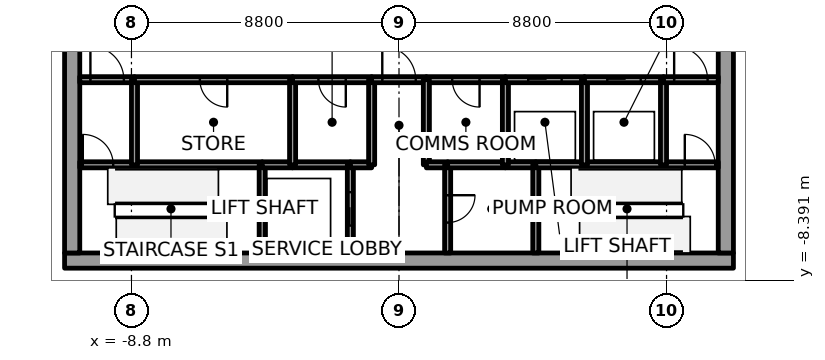
"""IFC4 building model, lengths in metres.
Left out: names, types, materials, properties, quantities, classifications, styles, units other than length and angle.
Written with IfcOpenShell. Run it as: python <this file> out.ifc"""

import sys

from ifc_helpers import new_model, si_unit, direction, frame, frame_2d, origin, place, context, subcontext, project, spatial, rectangle, extrude, element, fill, save


model = new_model("IFC4")
c1 = context("Model", 3, precision=1e-05, world=origin(), true_north=direction((0.0, 1.0)))
c2 = subcontext(c1, "Body", "Model", "MODEL_VIEW")
j1 = project(units=[si_unit("LENGTHUNIT", "METRE"), si_unit("PLANEANGLEUNIT", "RADIAN")], contexts=[c1])
p1 = place(None, origin())
s1 = spatial("IfcSite", under=j1, at=p1, CompositionType="ELEMENT")
p2 = place(p1, origin())
s2 = spatial("IfcBuilding", under=s1, at=p2, CompositionType="ELEMENT")
p3 = place(p2, frame((0.0, 0.0, -9.0)))
s3 = spatial("IfcBuildingStorey", under=s2, at=p3, CompositionType="ELEMENT", Elevation=-9.0)
p4 = place(p3, frame((-11.0, -7.75, 0.0), z_axis=(0.0, 0.0, 1.0), x_axis=(1.0, 0.0, 0.0)))
e1 = element("IfcWall", 1, at=p4, inside=s3, PredefinedType="SHEAR", context=c2, shape_type="SweptSolid", body=[
    extrude(rectangle(XDim=22.0, YDim=0.5, at=frame_2d((11.0, 0.0))), origin(), (0.0, 0.0, 1.0), 4.5),
])
for number, where, z_axis, x_axis in (
    (2, (-10.75, -7.5, 0.0), (0.0, 0.0, 1.0), (0.0, 1.0, 0.0)),
    (3, (10.75, -7.5, 0.0), (0.0, 0.0, 1.0), (0.0, 1.0, 0.0)),
):
    element("IfcWall", number, at=place(p3, frame(where, z_axis=z_axis, x_axis=x_axis)), inside=s3, PredefinedType="SHEAR", context=c2, shape_type="SweptSolid", body=[
        extrude(rectangle(XDim=15.0, YDim=0.5, at=frame_2d((7.5, 0.0))), origin(), (0.0, 0.0, 1.0), 4.5),
    ])
p5 = place(p3, frame((-10.5, -4.6, 0.0), z_axis=(0.0, 0.0, 1.0), x_axis=(1.0, 0.0, 0.0)))
e4 = element("IfcWall", 4, at=p5, inside=s3, PredefinedType="SOLIDWALL", context=c2, shape_type="SweptSolid", body=[
    extrude(rectangle(XDim=1.8, YDim=0.2, at=frame_2d((0.9, 0.0))), origin(), (0.0, 0.0, 1.0), 4.35),
])
p6 = place(p5, frame((0.1, 0.0, 0.0)))
e5 = element("IfcOpeningElement", 5, at=p6, cuts=e4, PredefinedType="OPENING", context=c2, shape_type="SweptSolid", body=[
    extrude(rectangle(XDim=1.0, YDim=2.1, at=frame_2d((0.5, 1.05))), frame((0.0, 0.1, 0.0), z_axis=(0.0, -1.0, 0.0), x_axis=(1.0, 0.0, 0.0)), (0.0, 0.0, 1.0), 0.2),
])
p7 = place(p3, frame((-10.5, -1.8, 0.0), z_axis=(0.0, 0.0, 1.0), x_axis=(1.0, 0.0, 0.0)))
e6 = element("IfcWall", 6, at=p7, inside=s3, PredefinedType="SOLIDWALL", context=c2, shape_type="SweptSolid", body=[
    extrude(rectangle(XDim=1.8, YDim=0.2, at=frame_2d((0.9, 0.0))), origin(), (0.0, 0.0, 1.0), 4.35),
])
p8 = place(p7, frame((0.35, 0.0, 0.0)))
e7 = element("IfcOpeningElement", 7, at=p8, cuts=e6, PredefinedType="OPENING", context=c2, shape_type="SweptSolid", body=[
    extrude(rectangle(XDim=1.1, YDim=2.4, at=frame_2d((0.55, 1.2))), frame((0.0, 0.1, 0.0), z_axis=(0.0, -1.0, 0.0), x_axis=(1.0, 0.0, 0.0)), (0.0, 0.0, 1.0), 0.2),
])
p9 = place(p3, frame((-8.7, -4.6, 0.0), z_axis=(0.0, 0.0, 1.0), x_axis=(1.0, 0.0, 0.0)))
e8 = element("IfcWall", 8, at=p9, inside=s3, PredefinedType="SOLIDWALL", context=c2, shape_type="SweptSolid", body=[
    extrude(rectangle(XDim=4.2, YDim=0.2, at=frame_2d((2.1, 0.0))), origin(), (0.0, 0.0, 1.0), 4.35),
])
p10 = place(p3, frame((-8.7, -1.8, 0.0), z_axis=(0.0, 0.0, 1.0), x_axis=(0.0, -1.0, 0.0)))
e9 = element("IfcWall", 9, at=p10, inside=s3, PredefinedType="SOLIDWALL", context=c2, shape_type="SweptSolid", body=[
    extrude(rectangle(XDim=2.8, YDim=0.2, at=frame_2d((1.4, 0.0))), origin(), (0.0, 0.0, 1.0), 4.35),
])
p11 = place(p3, frame((-3.5, -1.8, 0.0), z_axis=(0.0, 0.0, 1.0), x_axis=(-1.0, 0.0, 0.0)))
e10 = element("IfcWall", 10, at=p11, inside=s3, PredefinedType="SOLIDWALL", context=c2, shape_type="SweptSolid", body=[
    extrude(rectangle(XDim=5.2, YDim=0.2, at=frame_2d((2.6, 0.0))), origin(), (0.0, 0.0, 1.0), 4.35),
])
p12 = place(p11, frame((2.15, 0.0, 0.0)))
e11 = element("IfcOpeningElement", 11, at=p12, cuts=e10, PredefinedType="OPENING", context=c2, shape_type="SweptSolid", body=[
    extrude(rectangle(XDim=0.9, YDim=2.4, at=frame_2d((0.45, 1.2))), frame((0.0, 0.1, 0.0), z_axis=(0.0, -1.0, 0.0), x_axis=(1.0, 0.0, 0.0)), (0.0, 0.0, 1.0), 0.2),
])
p13 = place(p3, frame((-4.5, -4.6, 0.0), z_axis=(0.0, 0.0, 1.0), x_axis=(0.0, -1.0, 0.0)))
e12 = element("IfcWall", 12, at=p13, inside=s3, PredefinedType="SOLIDWALL", context=c2, shape_type="SweptSolid", body=[
    extrude(rectangle(XDim=2.9, YDim=0.2, at=frame_2d((1.45, 0.0))), origin(), (0.0, 0.0, 1.0), 4.35),
])
p14 = place(p3, frame((-4.5, -4.6, 0.0), z_axis=(0.0, 0.0, 1.0), x_axis=(1.0, 0.0, 0.0)))
e13 = element("IfcWall", 13, at=p14, inside=s3, PredefinedType="SOLIDWALL", context=c2, shape_type="SweptSolid", body=[
    extrude(rectangle(XDim=1.0, YDim=0.2, at=frame_2d((0.5, 0.0))), origin(), (0.0, 0.0, 1.0), 4.35),
])
p15 = place(p3, frame((-3.5, -4.6, 0.0), z_axis=(0.0, 0.0, 1.0), x_axis=(1.0, 0.0, 0.0)))
e14 = element("IfcWall", 14, at=p15, inside=s3, PredefinedType="SOLIDWALL", context=c2, shape_type="SweptSolid", body=[
    extrude(rectangle(XDim=1.9, YDim=0.2, at=frame_2d((0.95, 0.0))), origin(), (0.0, 0.0, 1.0), 4.35),
])
p16 = place(p3, frame((-3.5, -4.6, 0.0), z_axis=(0.0, 0.0, 1.0), x_axis=(0.0, 1.0, 0.0)))
e15 = element("IfcWall", 15, at=p16, inside=s3, PredefinedType="SOLIDWALL", context=c2, shape_type="SweptSolid", body=[
    extrude(rectangle(XDim=2.8, YDim=0.2, at=frame_2d((1.4, 0.0))), origin(), (0.0, 0.0, 1.0), 4.35),
])
p17 = place(p3, frame((-0.9, -1.8, 0.0), z_axis=(0.0, 0.0, 1.0), x_axis=(-1.0, 0.0, 0.0)))
e16 = element("IfcWall", 16, at=p17, inside=s3, PredefinedType="SOLIDWALL", context=c2, shape_type="SweptSolid", body=[
    extrude(rectangle(XDim=2.6, YDim=0.2, at=frame_2d((1.3, 0.0))), origin(), (0.0, 0.0, 1.0), 4.35),
])
p18 = place(p17, frame((0.85, 0.0, 0.0)))
e17 = element("IfcOpeningElement", 17, at=p18, cuts=e16, PredefinedType="OPENING", context=c2, shape_type="SweptSolid", body=[
    extrude(rectangle(XDim=0.9, YDim=2.4, at=frame_2d((0.45, 1.2))), frame((0.0, 0.1, 0.0), z_axis=(0.0, -1.0, 0.0), x_axis=(1.0, 0.0, 0.0)), (0.0, 0.0, 1.0), 0.2),
])
p19 = place(p3, frame((-1.6, -7.5, 0.0), z_axis=(0.0, 0.0, 1.0), x_axis=(0.0, 1.0, 0.0)))
e18 = element("IfcWall", 18, at=p19, inside=s3, PredefinedType="SOLIDWALL", context=c2, shape_type="SweptSolid", body=[
    extrude(rectangle(XDim=2.9, YDim=0.2, at=frame_2d((1.45, 0.0))), origin(), (0.0, 0.0, 1.0), 4.35),
])
p20 = place(p19, frame((0.9, 0.0, 0.0)))
e19 = element("IfcOpeningElement", 19, at=p20, cuts=e18, PredefinedType="OPENING", context=c2, shape_type="SweptSolid", body=[
    extrude(rectangle(XDim=1.1, YDim=2.1, at=frame_2d((0.55, 1.05))), frame((0.0, 0.1, 0.0), z_axis=(0.0, -1.0, 0.0), x_axis=(1.0, 0.0, 0.0)), (0.0, 0.0, 1.0), 0.2),
])
p21 = place(p3, frame((-1.6, -4.6, 0.0), z_axis=(0.0, 0.0, 1.0), x_axis=(1.0, 0.0, 0.0)))
e20 = element("IfcWall", 20, at=p21, inside=s3, PredefinedType="SOLIDWALL", context=c2, shape_type="SweptSolid", body=[
    extrude(rectangle(XDim=0.7, YDim=0.2, at=frame_2d((0.35, 0.0))), origin(), (0.0, 0.0, 1.0), 4.35),
])
p22 = place(p3, frame((-0.9, -4.6, 0.0), z_axis=(0.0, 0.0, 1.0), x_axis=(0.0, 1.0, 0.0)))
e21 = element("IfcWall", 21, at=p22, inside=s3, PredefinedType="SOLIDWALL", context=c2, shape_type="SweptSolid", body=[
    extrude(rectangle(XDim=2.8, YDim=0.2, at=frame_2d((1.4, 0.0))), origin(), (0.0, 0.0, 1.0), 4.35),
])
p23 = place(p3, frame((-0.9, -1.8, 0.0), z_axis=(0.0, 0.0, 1.0), x_axis=(1.0, 0.0, 0.0)))
e22 = element("IfcWall", 22, at=p23, inside=s3, PredefinedType="SOLIDWALL", context=c2, shape_type="SweptSolid", body=[
    extrude(rectangle(XDim=1.8, YDim=0.2, at=frame_2d((0.9, 0.0))), origin(), (0.0, 0.0, 1.0), 4.35),
])
p24 = place(p23, frame((0.35, 0.0, 0.0)))
e23 = element("IfcOpeningElement", 23, at=p24, cuts=e22, PredefinedType="OPENING", context=c2, shape_type="SweptSolid", body=[
    extrude(rectangle(XDim=1.1, YDim=2.4, at=frame_2d((0.55, 1.2))), frame((0.0, 0.1, 0.0), z_axis=(0.0, -1.0, 0.0), x_axis=(1.0, 0.0, 0.0)), (0.0, 0.0, 1.0), 0.2),
])
p25 = place(p3, frame((3.5, -1.8, 0.0), z_axis=(0.0, 0.0, 1.0), x_axis=(-1.0, 0.0, 0.0)))
e24 = element("IfcWall", 24, at=p25, inside=s3, PredefinedType="SOLIDWALL", context=c2, shape_type="SweptSolid", body=[
    extrude(rectangle(XDim=2.6, YDim=0.2, at=frame_2d((1.3, 0.0))), origin(), (0.0, 0.0, 1.0), 4.35),
])
p26 = place(p25, frame((0.85, 0.0, 0.0)))
e25 = element("IfcOpeningElement", 25, at=p26, cuts=e24, PredefinedType="OPENING", context=c2, shape_type="SweptSolid", body=[
    extrude(rectangle(XDim=0.9, YDim=2.4, at=frame_2d((0.45, 1.2))), frame((0.0, 0.1, 0.0), z_axis=(0.0, -1.0, 0.0), x_axis=(1.0, 0.0, 0.0)), (0.0, 0.0, 1.0), 0.2),
])
p27 = place(p3, frame((0.9, -1.8, 0.0), z_axis=(0.0, 0.0, 1.0), x_axis=(0.0, -1.0, 0.0)))
e26 = element("IfcWall", 26, at=p27, inside=s3, PredefinedType="SOLIDWALL", context=c2, shape_type="SweptSolid", body=[
    extrude(rectangle(XDim=2.8, YDim=0.2, at=frame_2d((1.4, 0.0))), origin(), (0.0, 0.0, 1.0), 4.35),
])
p28 = place(p3, frame((0.9, -4.6, 0.0), z_axis=(0.0, 0.0, 1.0), x_axis=(1.0, 0.0, 0.0)))
e27 = element("IfcWall", 27, at=p28, inside=s3, PredefinedType="SOLIDWALL", context=c2, shape_type="SweptSolid", body=[
    extrude(rectangle(XDim=0.7, YDim=0.2, at=frame_2d((0.35, 0.0))), origin(), (0.0, 0.0, 1.0), 4.35),
])
p29 = place(p3, frame((1.6, -4.6, 0.0), z_axis=(0.0, 0.0, 1.0), x_axis=(0.0, -1.0, 0.0)))
e28 = element("IfcWall", 28, at=p29, inside=s3, PredefinedType="SOLIDWALL", context=c2, shape_type="SweptSolid", body=[
    extrude(rectangle(XDim=2.9, YDim=0.2, at=frame_2d((1.45, 0.0))), origin(), (0.0, 0.0, 1.0), 4.35),
])
p30 = place(p29, frame((1.0, 0.0, 0.0)))
e29 = element("IfcOpeningElement", 29, at=p30, cuts=e28, PredefinedType="OPENING", context=c2, shape_type="SweptSolid", body=[
    extrude(rectangle(XDim=0.9, YDim=2.4, at=frame_2d((0.45, 1.2))), frame((0.0, 0.1, 0.0), z_axis=(0.0, -1.0, 0.0), x_axis=(1.0, 0.0, 0.0)), (0.0, 0.0, 1.0), 0.2),
])
p31 = place(p3, frame((1.6, -4.6, 0.0), z_axis=(0.0, 0.0, 1.0), x_axis=(1.0, 0.0, 0.0)))
e30 = element("IfcWall", 30, at=p31, inside=s3, PredefinedType="SOLIDWALL", context=c2, shape_type="SweptSolid", body=[
    extrude(rectangle(XDim=1.9, YDim=0.2, at=frame_2d((0.95, 0.0))), origin(), (0.0, 0.0, 1.0), 4.35),
])
p32 = place(p3, frame((4.5, -4.6, 0.0), z_axis=(0.0, 0.0, 1.0), x_axis=(-1.0, 0.0, 0.0)))
e31 = element("IfcWall", 31, at=p32, inside=s3, PredefinedType="SOLIDWALL", context=c2, shape_type="SweptSolid", body=[
    extrude(rectangle(XDim=1.0, YDim=0.2, at=frame_2d((0.5, 0.0))), origin(), (0.0, 0.0, 1.0), 4.35),
])
p33 = place(p3, frame((3.5, -4.6, 0.0), z_axis=(0.0, 0.0, 1.0), x_axis=(0.0, 1.0, 0.0)))
e32 = element("IfcWall", 32, at=p33, inside=s3, PredefinedType="SOLIDWALL", context=c2, shape_type="SweptSolid", body=[
    extrude(rectangle(XDim=2.8, YDim=0.2, at=frame_2d((1.4, 0.0))), origin(), (0.0, 0.0, 1.0), 4.35),
])
p34 = place(p3, frame((3.5, -1.8, 0.0), z_axis=(0.0, 0.0, 1.0), x_axis=(1.0, 0.0, 0.0)))
e33 = element("IfcWall", 33, at=p34, inside=s3, PredefinedType="SOLIDWALL", context=c2, shape_type="SweptSolid", body=[
    extrude(rectangle(XDim=2.6, YDim=0.2, at=frame_2d((1.3, 0.0))), origin(), (0.0, 0.0, 1.0), 4.35),
])
p35 = place(p34, frame((0.75, 0.0, 0.0)))
e34 = element("IfcOpeningElement", 34, at=p35, cuts=e33, PredefinedType="OPENING", context=c2, shape_type="SweptSolid", body=[
    extrude(rectangle(XDim=1.1, YDim=2.1, at=frame_2d((0.55, 1.05))), frame((0.0, 0.1, 0.0), z_axis=(0.0, -1.0, 0.0), x_axis=(1.0, 0.0, 0.0)), (0.0, 0.0, 1.0), 0.2),
])
p36 = place(p3, frame((4.5, -7.5, 0.0), z_axis=(0.0, 0.0, 1.0), x_axis=(0.0, 1.0, 0.0)))
e35 = element("IfcWall", 35, at=p36, inside=s3, PredefinedType="SOLIDWALL", context=c2, shape_type="SweptSolid", body=[
    extrude(rectangle(XDim=2.9, YDim=0.2, at=frame_2d((1.45, 0.0))), origin(), (0.0, 0.0, 1.0), 4.35),
])
p37 = place(p3, frame((4.5, -4.6, 0.0), z_axis=(0.0, 0.0, 1.0), x_axis=(1.0, 0.0, 0.0)))
e36 = element("IfcWall", 36, at=p37, inside=s3, PredefinedType="SOLIDWALL", context=c2, shape_type="SweptSolid", body=[
    extrude(rectangle(XDim=1.6, YDim=0.2, at=frame_2d((0.8, 0.0))), origin(), (0.0, 0.0, 1.0), 4.35),
])
p38 = place(p3, frame((6.1, -4.6, 0.0), z_axis=(0.0, 0.0, 1.0), x_axis=(1.0, 0.0, 0.0)))
e37 = element("IfcWall", 37, at=p38, inside=s3, PredefinedType="SOLIDWALL", context=c2, shape_type="SweptSolid", body=[
    extrude(rectangle(XDim=2.6, YDim=0.2, at=frame_2d((1.3, 0.0))), origin(), (0.0, 0.0, 1.0), 4.35),
])
p39 = place(p3, frame((6.1, -4.6, 0.0), z_axis=(0.0, 0.0, 1.0), x_axis=(0.0, 1.0, 0.0)))
e38 = element("IfcWall", 38, at=p39, inside=s3, PredefinedType="SOLIDWALL", context=c2, shape_type="SweptSolid", body=[
    extrude(rectangle(XDim=2.8, YDim=0.2, at=frame_2d((1.4, 0.0))), origin(), (0.0, 0.0, 1.0), 4.35),
])
p40 = place(p3, frame((6.1, -1.8, 0.0), z_axis=(0.0, 0.0, 1.0), x_axis=(1.0, 0.0, 0.0)))
e39 = element("IfcWall", 39, at=p40, inside=s3, PredefinedType="SOLIDWALL", context=c2, shape_type="SweptSolid", body=[
    extrude(rectangle(XDim=2.6, YDim=0.2, at=frame_2d((1.3, 0.0))), origin(), (0.0, 0.0, 1.0), 4.35),
])
p41 = place(p40, frame((0.75, 0.0, 0.0)))
e40 = element("IfcOpeningElement", 40, at=p41, cuts=e39, PredefinedType="OPENING", context=c2, shape_type="SweptSolid", body=[
    extrude(rectangle(XDim=1.1, YDim=2.1, at=frame_2d((0.55, 1.05))), frame((0.0, 0.1, 0.0), z_axis=(0.0, -1.0, 0.0), x_axis=(1.0, 0.0, 0.0)), (0.0, 0.0, 1.0), 0.2),
])
p42 = place(p3, frame((8.7, -4.6, 0.0), z_axis=(0.0, 0.0, 1.0), x_axis=(1.0, 0.0, 0.0)))
e41 = element("IfcWall", 41, at=p42, inside=s3, PredefinedType="SOLIDWALL", context=c2, shape_type="SweptSolid", body=[
    extrude(rectangle(XDim=1.8, YDim=0.2, at=frame_2d((0.9, 0.0))), origin(), (0.0, 0.0, 1.0), 4.35),
])
p43 = place(p42, frame((0.7, 0.0, 0.0)))
e42 = element("IfcOpeningElement", 42, at=p43, cuts=e41, PredefinedType="OPENING", context=c2, shape_type="SweptSolid", body=[
    extrude(rectangle(XDim=1.0, YDim=2.1, at=frame_2d((0.5, 1.05))), frame((0.0, 0.1, 0.0), z_axis=(0.0, -1.0, 0.0), x_axis=(1.0, 0.0, 0.0)), (0.0, 0.0, 1.0), 0.2),
])
p44 = place(p3, frame((8.7, -1.8, 0.0), z_axis=(0.0, 0.0, 1.0), x_axis=(0.0, -1.0, 0.0)))
e43 = element("IfcWall", 43, at=p44, inside=s3, PredefinedType="SOLIDWALL", context=c2, shape_type="SweptSolid", body=[
    extrude(rectangle(XDim=2.8, YDim=0.2, at=frame_2d((1.4, 0.0))), origin(), (0.0, 0.0, 1.0), 4.35),
])
p45 = place(p3, frame((8.7, -1.8, 0.0), z_axis=(0.0, 0.0, 1.0), x_axis=(1.0, 0.0, 0.0)))
e44 = element("IfcWall", 44, at=p45, inside=s3, PredefinedType="SOLIDWALL", context=c2, shape_type="SweptSolid", body=[
    extrude(rectangle(XDim=1.8, YDim=0.2, at=frame_2d((0.9, 0.0))), origin(), (0.0, 0.0, 1.0), 4.35),
])
p46 = place(p45, frame((0.35, 0.0, 0.0)))
e45 = element("IfcOpeningElement", 45, at=p46, cuts=e44, PredefinedType="OPENING", context=c2, shape_type="SweptSolid", body=[
    extrude(rectangle(XDim=1.1, YDim=2.4, at=frame_2d((0.55, 1.2))), frame((0.0, 0.1, 0.0), z_axis=(0.0, -1.0, 0.0), x_axis=(1.0, 0.0, 0.0)), (0.0, 0.0, 1.0), 0.2),
])
p47 = place(p35, origin())
e46 = element("IfcDoor", 46, at=p47, inside=s3, OperationType="SLIDING_TO_LEFT", PredefinedType="DOOR", context=c2, shape_type="SweptSolid", body=[
    extrude(rectangle(XDim=1.1, YDim=2.1, at=frame_2d((0.55, 1.05))), frame((0.0, 0.025, 0.0), z_axis=(0.0, -1.0, 0.0), x_axis=(1.0, 0.0, 0.0)), (0.0, 0.0, 1.0), 0.05),
])
fill(e34, e46)
p48 = place(p41, origin())
e47 = element("IfcDoor", 47, at=p48, inside=s3, OperationType="SLIDING_TO_RIGHT", PredefinedType="DOOR", context=c2, shape_type="SweptSolid", body=[
    extrude(rectangle(XDim=1.1, YDim=2.1, at=frame_2d((0.55, 1.05))), frame((0.0, 0.025, 0.0), z_axis=(0.0, -1.0, 0.0), x_axis=(1.0, 0.0, 0.0)), (0.0, 0.0, 1.0), 0.05),
])
fill(e40, e47)
p49 = place(p20, origin())
e48 = element("IfcDoor", 48, at=p49, inside=s3, OperationType="SLIDING_TO_LEFT", PredefinedType="DOOR", context=c2, shape_type="SweptSolid", body=[
    extrude(rectangle(XDim=1.1, YDim=2.1, at=frame_2d((0.55, 1.05))), frame((0.0, 0.025, 0.0), z_axis=(0.0, -1.0, 0.0), x_axis=(1.0, 0.0, 0.0)), (0.0, 0.0, 1.0), 0.05),
])
fill(e19, e48)
p50 = place(p8, origin())
e49 = element("IfcDoor", 49, at=p50, inside=s3, OperationType="SINGLE_SWING_LEFT", PredefinedType="DOOR", context=c2, shape_type="SweptSolid", body=[
    extrude(rectangle(XDim=1.1, YDim=2.4, at=frame_2d((0.55, 1.2))), frame((0.0, 0.025, 0.0), z_axis=(0.0, -1.0, 0.0), x_axis=(1.0, 0.0, 0.0)), (0.0, 0.0, 1.0), 0.05),
])
fill(e7, e49)
p51 = place(p46, origin())
e50 = element("IfcDoor", 50, at=p51, inside=s3, OperationType="SINGLE_SWING_LEFT", PredefinedType="DOOR", context=c2, shape_type="SweptSolid", body=[
    extrude(rectangle(XDim=1.1, YDim=2.4, at=frame_2d((0.55, 1.2))), frame((0.0, 0.025, 0.0), z_axis=(0.0, -1.0, 0.0), x_axis=(1.0, 0.0, 0.0)), (0.0, 0.0, 1.0), 0.05),
])
fill(e45, e50)
p52 = place(p24, origin())
e51 = element("IfcDoor", 51, at=p52, inside=s3, OperationType="SINGLE_SWING_LEFT", PredefinedType="DOOR", context=c2, shape_type="SweptSolid", body=[
    extrude(rectangle(XDim=1.1, YDim=2.4, at=frame_2d((0.55, 1.2))), frame((0.0, 0.025, 0.0), z_axis=(0.0, -1.0, 0.0), x_axis=(1.0, 0.0, 0.0)), (0.0, 0.0, 1.0), 0.05),
])
fill(e23, e51)
p53 = place(p6, origin())
e52 = element("IfcDoor", 52, at=p53, inside=s3, OperationType="SINGLE_SWING_LEFT", PredefinedType="DOOR", context=c2, shape_type="SweptSolid", body=[
    extrude(rectangle(XDim=1.0, YDim=2.1, at=frame_2d((0.5, 1.05))), frame((0.0, 0.025, 0.0), z_axis=(0.0, -1.0, 0.0), x_axis=(1.0, 0.0, 0.0)), (0.0, 0.0, 1.0), 0.05),
])
fill(e5, e52)
p54 = place(p43, origin())
e53 = element("IfcDoor", 53, at=p54, inside=s3, OperationType="SINGLE_SWING_RIGHT", PredefinedType="DOOR", context=c2, shape_type="SweptSolid", body=[
    extrude(rectangle(XDim=1.0, YDim=2.1, at=frame_2d((0.5, 1.05))), frame((0.0, 0.025, 0.0), z_axis=(0.0, -1.0, 0.0), x_axis=(1.0, 0.0, 0.0)), (0.0, 0.0, 1.0), 0.05),
])
fill(e42, e53)
p55 = place(p12, origin())
e54 = element("IfcDoor", 54, at=p55, inside=s3, OperationType="SINGLE_SWING_RIGHT", PredefinedType="DOOR", context=c2, shape_type="SweptSolid", body=[
    extrude(rectangle(XDim=0.9, YDim=2.4, at=frame_2d((0.45, 1.2))), frame((0.0, 0.025, 0.0), z_axis=(0.0, -1.0, 0.0), x_axis=(1.0, 0.0, 0.0)), (0.0, 0.0, 1.0), 0.05),
])
fill(e11, e54)
p56 = place(p18, origin())
e55 = element("IfcDoor", 55, at=p56, inside=s3, OperationType="SINGLE_SWING_LEFT", PredefinedType="DOOR", context=c2, shape_type="SweptSolid", body=[
    extrude(rectangle(XDim=0.9, YDim=2.4, at=frame_2d((0.45, 1.2))), frame((0.0, 0.025, 0.0), z_axis=(0.0, -1.0, 0.0), x_axis=(1.0, 0.0, 0.0)), (0.0, 0.0, 1.0), 0.05),
])
fill(e17, e55)
p57 = place(p26, origin())
e56 = element("IfcDoor", 56, at=p57, inside=s3, OperationType="SINGLE_SWING_RIGHT", PredefinedType="DOOR", context=c2, shape_type="SweptSolid", body=[
    extrude(rectangle(XDim=0.9, YDim=2.4, at=frame_2d((0.45, 1.2))), frame((0.0, 0.025, 0.0), z_axis=(0.0, -1.0, 0.0), x_axis=(1.0, 0.0, 0.0)), (0.0, 0.0, 1.0), 0.05),
])
fill(e25, e56)
p58 = place(p30, origin())
e57 = element("IfcDoor", 57, at=p58, inside=s3, OperationType="SINGLE_SWING_RIGHT", PredefinedType="DOOR", context=c2, shape_type="SweptSolid", body=[
    extrude(rectangle(XDim=0.9, YDim=2.4, at=frame_2d((0.45, 1.2))), frame((0.0, 0.025, 0.0), z_axis=(0.0, -1.0, 0.0), x_axis=(1.0, 0.0, 0.0)), (0.0, 0.0, 1.0), 0.05),
])
fill(e29, e57)
save(model, sys.argv[1])
